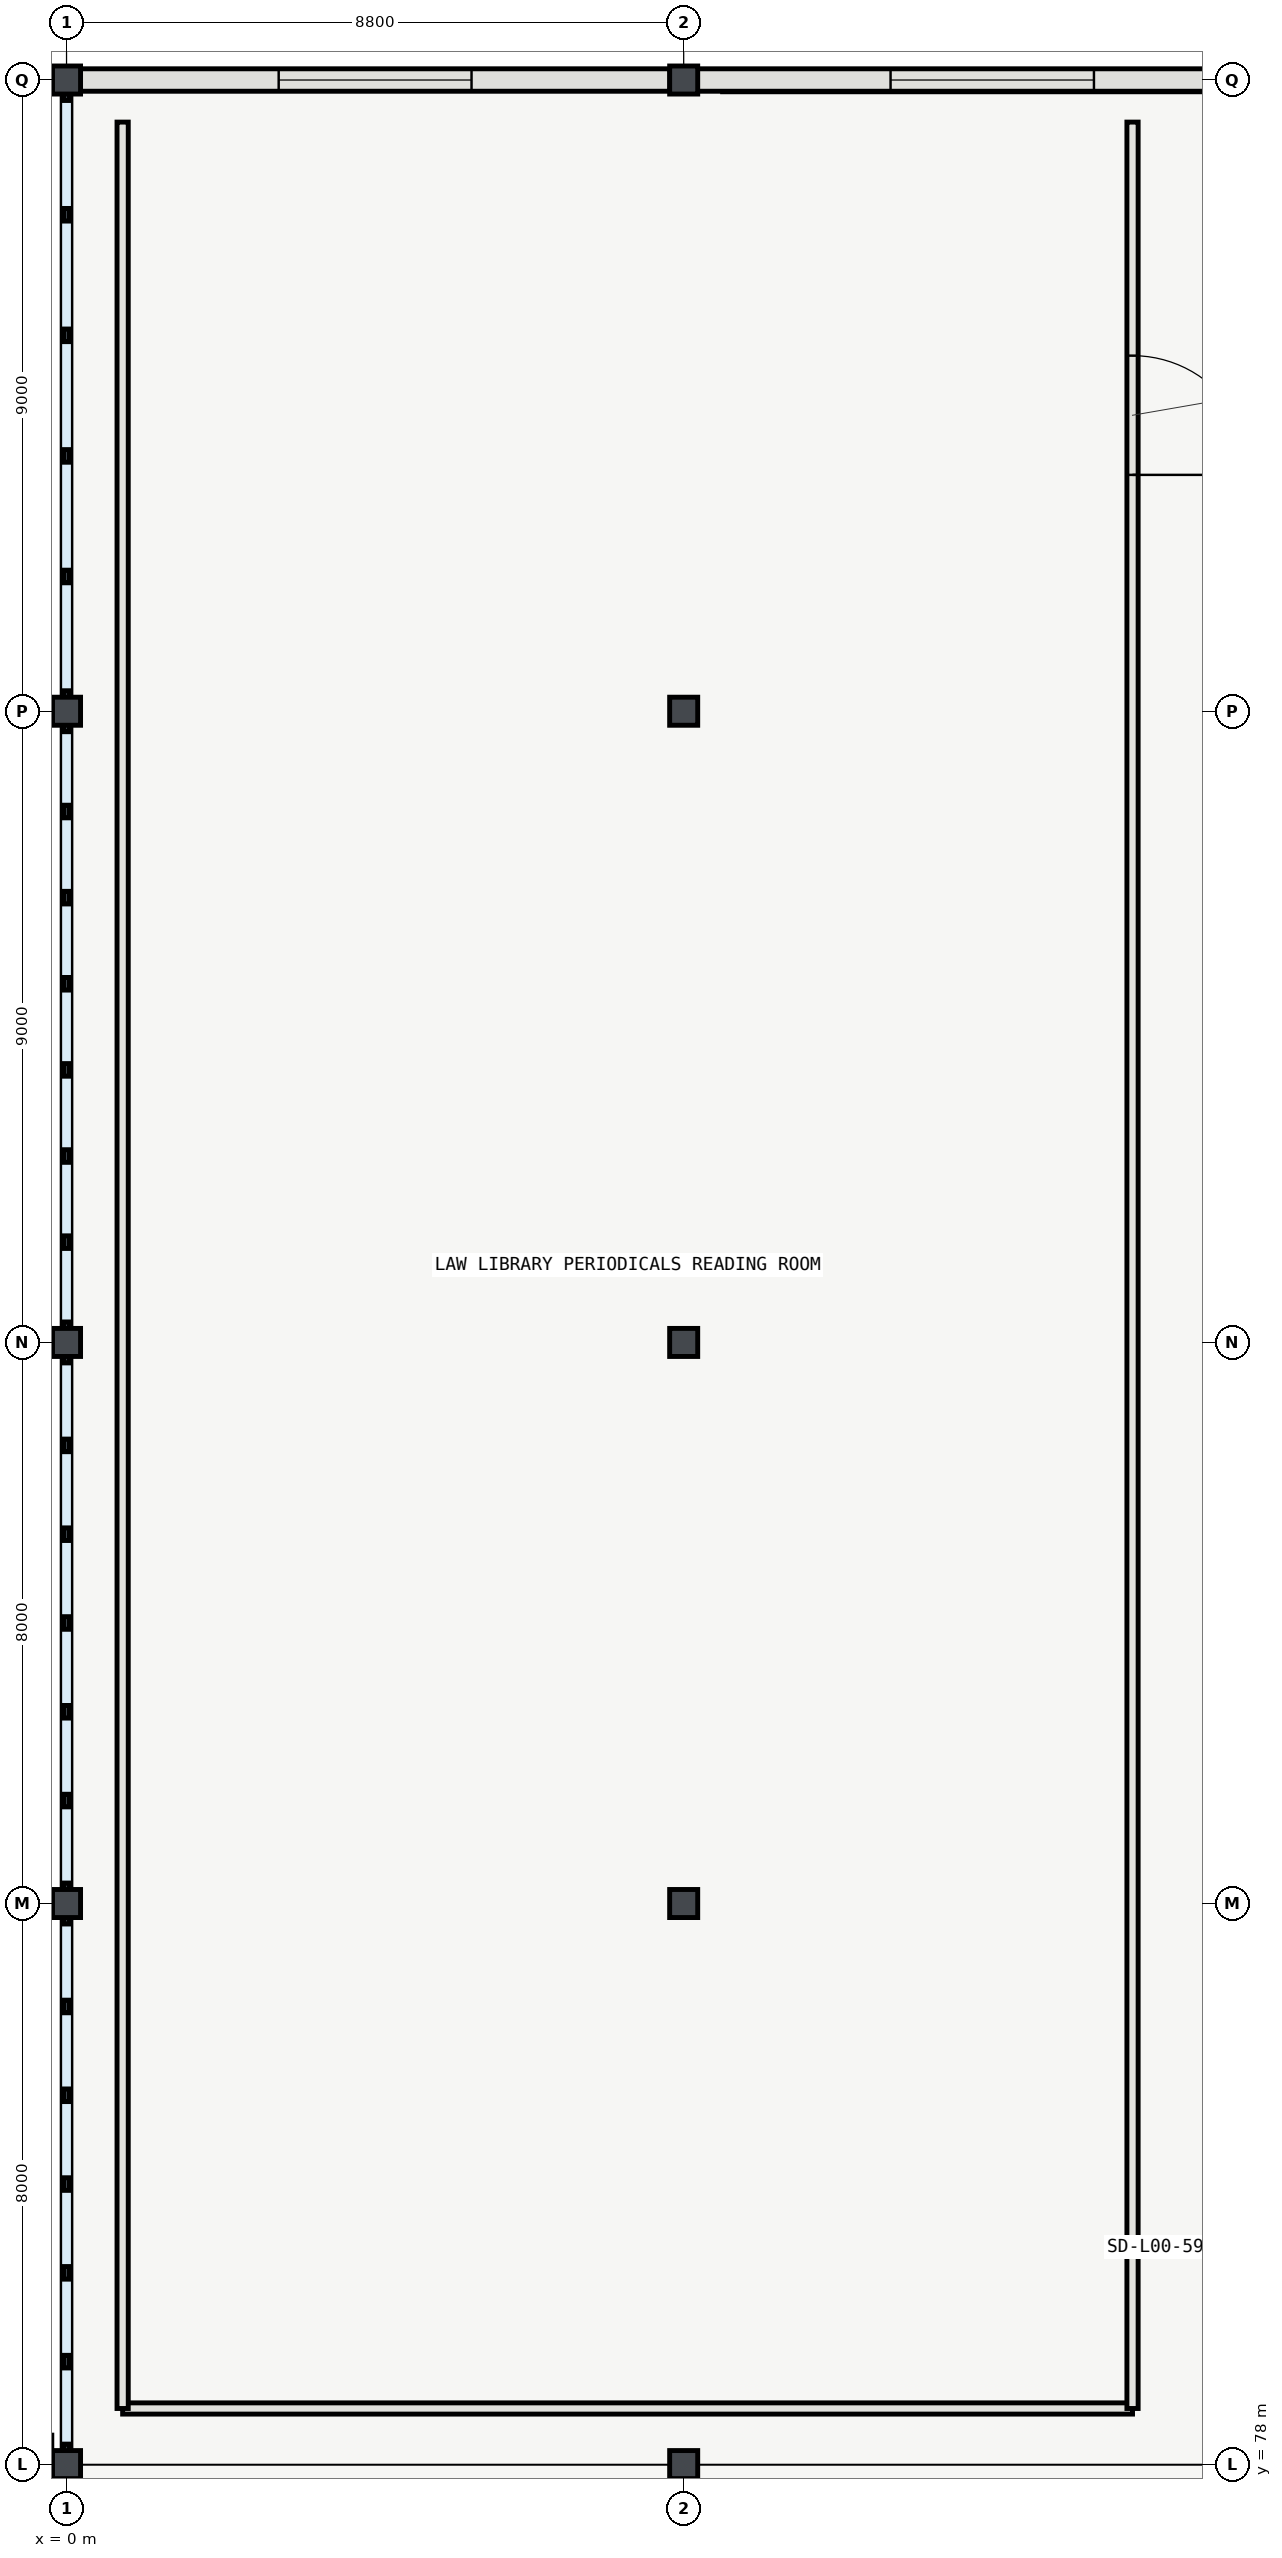
"""IFC4 building model, lengths in metres.
Left out: names, types, materials, properties, quantities, classifications, styles, units other than length and angle.
Written with IfcOpenShell. Run it as: python <this file> out.ifc"""

import sys

from ifc_helpers import new_model, si_unit, direction, frame, frame_2d, origin, origin_2d, place, context, subcontext, project, spatial, rectangle, i_section, extrude, element, fill, save


model = new_model("IFC4")
c1 = context("Model", 3, precision=1e-05, world=origin(), true_north=direction((0.0, 1.0)))
c2 = subcontext(c1, "Body", "Model", "MODEL_VIEW")
j1 = project(units=[si_unit("LENGTHUNIT", "METRE"), si_unit("PLANEANGLEUNIT", "RADIAN")], contexts=[c1])
p1 = place(None, origin())
s1 = spatial("IfcSite", under=j1, at=p1, CompositionType="ELEMENT")
p2 = place(p1, origin())
s2 = spatial("IfcBuilding", under=s1, at=p2, CompositionType="ELEMENT")
p3 = place(p2, origin())
s3 = spatial("IfcBuildingStorey", under=s2, at=p3, CompositionType="ELEMENT", Elevation=0.0)
for number, where, z_axis, x_axis in (
    (1, (0.0, 78.0, 0.0), (0.0, 0.0, 1.0), (1.0, 0.0, 0.0)),
    (2, (0.0, 86.0, 0.0), (0.0, 0.0, 1.0), (1.0, 0.0, 0.0)),
    (3, (0.0, 94.0, 0.0), (0.0, 0.0, 1.0), (1.0, 0.0, 0.0)),
    (4, (0.0, 103.0, 0.0), (0.0, 0.0, 1.0), (1.0, 0.0, 0.0)),
    (5, (0.0, 112.0, 0.0), (0.0, 0.0, 1.0), (1.0, 0.0, 0.0)),
    (6, (8.8, 78.0, 0.0), (0.0, 0.0, 1.0), (1.0, 0.0, 0.0)),
    (7, (8.8, 86.0, 0.0), (0.0, 0.0, 1.0), (1.0, 0.0, 0.0)),
    (8, (8.8, 94.0, 0.0), (0.0, 0.0, 1.0), (1.0, 0.0, 0.0)),
    (9, (8.8, 103.0, 0.0), (0.0, 0.0, 1.0), (1.0, 0.0, 0.0)),
    (10, (8.8, 112.0, 0.0), (0.0, 0.0, 1.0), (1.0, 0.0, 0.0)),
):
    element("IfcColumn", number, at=place(p3, frame(where, z_axis=z_axis, x_axis=x_axis)), inside=s3, PredefinedType="COLUMN", context=c2, shape_type="SweptSolid", body=[
        extrude(i_section(OverallWidth=0.4, OverallDepth=0.4, WebThickness=0.013, FlangeThickness=0.021, FilletRadius=0.022, at=origin_2d()), origin(), (0.0, 0.0, 1.0), 5.4),
    ])
p4 = place(p3, frame((8.604, 112.0, 0.0), z_axis=(0.0, 0.0, 1.0), x_axis=(-1.0, 0.0, 0.0)))
e11 = element("IfcWall", 11, at=p4, inside=s3, PredefinedType="SOLIDWALL", context=c2, shape_type="SweptSolid", body=[
    extrude(rectangle(XDim=8.408, YDim=0.32, at=frame_2d((4.204, 0.0))), origin(), (0.0, 0.0, 1.0), 4.615),
])
p5 = place(p4, frame((2.829, 0.0, 0.95)))
e12 = element("IfcOpeningElement", 12, at=p5, cuts=e11, PredefinedType="OPENING", context=c2, shape_type="SweptSolid", body=[
    extrude(rectangle(XDim=2.75, YDim=1.95, at=frame_2d((1.375, 0.975))), frame((0.0, 0.17, 0.0), z_axis=(0.0, -1.0, 0.0), x_axis=(1.0, 0.0, 0.0)), (0.0, 0.0, 1.0), 0.34),
])
p6 = place(p3, frame((17.404, 112.0, 0.0), z_axis=(0.0, 0.0, 1.0), x_axis=(-1.0, 0.0, 0.0)))
e13 = element("IfcWall", 13, at=p6, inside=s3, PredefinedType="SOLIDWALL", context=c2, shape_type="SweptSolid", body=[
    extrude(rectangle(XDim=8.408, YDim=0.32, at=frame_2d((4.204, 0.0))), origin(), (0.0, 0.0, 1.0), 4.615),
])
p7 = place(p6, frame((2.754, 0.0, 0.95)))
e14 = element("IfcOpeningElement", 14, at=p7, cuts=e13, PredefinedType="OPENING", context=c2, shape_type="SweptSolid", body=[
    extrude(rectangle(XDim=2.9, YDim=1.95, at=frame_2d((1.45, 0.975))), frame((0.0, 0.17, 0.0), z_axis=(0.0, -1.0, 0.0), x_axis=(1.0, 0.0, 0.0)), (0.0, 0.0, 1.0), 0.34),
])
p8 = place(p3, frame((0.0, 77.804, 0.0), z_axis=(0.0, 0.0, 1.0), x_axis=(0.0, -1.0, 0.0)))
e15 = element("IfcWall", 15, at=p8, inside=s3, PredefinedType="SOLIDWALL", context=c2, shape_type="SweptSolid", body=[
    extrude(rectangle(XDim=7.483, YDim=0.32, at=frame_2d((3.741, 0.0))), origin(), (0.0, 0.0, 1.0), 4.523),
])
p9 = place(p8, frame((2.204, 0.0, 0.95)))
e16 = element("IfcOpeningElement", 16, at=p9, cuts=e15, PredefinedType="OPENING", context=c2, shape_type="SweptSolid", body=[
    extrude(rectangle(XDim=3.2, YDim=2.6, at=frame_2d((1.6, 1.3))), frame((0.0, 0.17, 0.0), z_axis=(0.0, -1.0, 0.0), x_axis=(1.0, 0.0, 0.0)), (0.0, 0.0, 1.0), 0.34),
])
p10 = place(p3, frame((0.8, 78.8, 0.0), z_axis=(0.0, 0.0, 1.0), x_axis=(1.0, 0.0, 0.0)))
e17 = element("IfcWall", 17, at=p10, inside=s3, PredefinedType="PARTITIONING", context=c2, shape_type="SweptSolid", body=[
    extrude(rectangle(XDim=14.4, YDim=0.16, at=frame_2d((7.2, 0.0))), origin(), (0.0, 0.0, 1.0), 5.12),
])
p11 = place(p3, frame((0.8, 111.4, 0.0), z_axis=(0.0, 0.0, 1.0), x_axis=(0.0, -1.0, 0.0)))
e18 = element("IfcWall", 18, at=p11, inside=s3, PredefinedType="PARTITIONING", context=c2, shape_type="SweptSolid", body=[
    extrude(rectangle(XDim=32.6, YDim=0.16, at=frame_2d((16.3, 0.0))), origin(), (0.0, 0.0, 1.0), 5.12),
])
p12 = place(p3, frame((15.2, 78.8, 0.0), z_axis=(0.0, 0.0, 1.0), x_axis=(0.0, 1.0, 0.0)))
e19 = element("IfcWall", 19, at=p12, inside=s3, PredefinedType="PARTITIONING", context=c2, shape_type="SweptSolid", body=[
    extrude(rectangle(XDim=32.6, YDim=0.16, at=frame_2d((16.3, 0.0))), origin(), (0.0, 0.0, 1.0), 5.12),
])
p13 = place(p12, frame((27.57, 0.0, 0.0)))
e20 = element("IfcOpeningElement", 20, at=p13, cuts=e19, PredefinedType="OPENING", context=c2, shape_type="SweptSolid", body=[
    extrude(rectangle(XDim=1.7, YDim=2.3, at=frame_2d((0.85, 1.15))), frame((0.0, 0.09, 0.0), z_axis=(0.0, -1.0, 0.0), x_axis=(1.0, 0.0, 0.0)), (0.0, 0.0, 1.0), 0.18),
])
p14 = place(p5, origin())
e21 = element("IfcWindow", 21, at=p14, inside=s3, PartitioningType="SINGLE_PANEL", PredefinedType="WINDOW", context=c2, shape_type="SweptSolid", body=[
    extrude(rectangle(XDim=2.75, YDim=1.95, at=frame_2d((1.375, 0.975))), frame((0.0, 0.03, 0.0), z_axis=(0.0, -1.0, 0.0), x_axis=(1.0, 0.0, 0.0)), (0.0, 0.0, 1.0), 0.06),
])
fill(e12, e21)
p15 = place(p7, origin())
e22 = element("IfcWindow", 22, at=p15, inside=s3, PartitioningType="SINGLE_PANEL", PredefinedType="WINDOW", context=c2, shape_type="SweptSolid", body=[
    extrude(rectangle(XDim=2.9, YDim=1.95, at=frame_2d((1.45, 0.975))), frame((0.0, 0.03, 0.0), z_axis=(0.0, -1.0, 0.0), x_axis=(1.0, 0.0, 0.0)), (0.0, 0.0, 1.0), 0.06),
])
fill(e14, e22)
p16 = place(p13, origin())
e23 = element("IfcDoor", 23, at=p16, inside=s3, OperationType="DOUBLE_DOOR_SINGLE_SWING", PredefinedType="DOOR", context=c2, shape_type="SweptSolid", body=[
    extrude(rectangle(XDim=1.7, YDim=2.3, at=frame_2d((0.85, 1.15))), frame((0.0, 0.025, 0.0), z_axis=(0.0, -1.0, 0.0), x_axis=(1.0, 0.0, 0.0)), (0.0, 0.0, 1.0), 0.05),
])
fill(e20, e23)
save(model, sys.argv[1])
